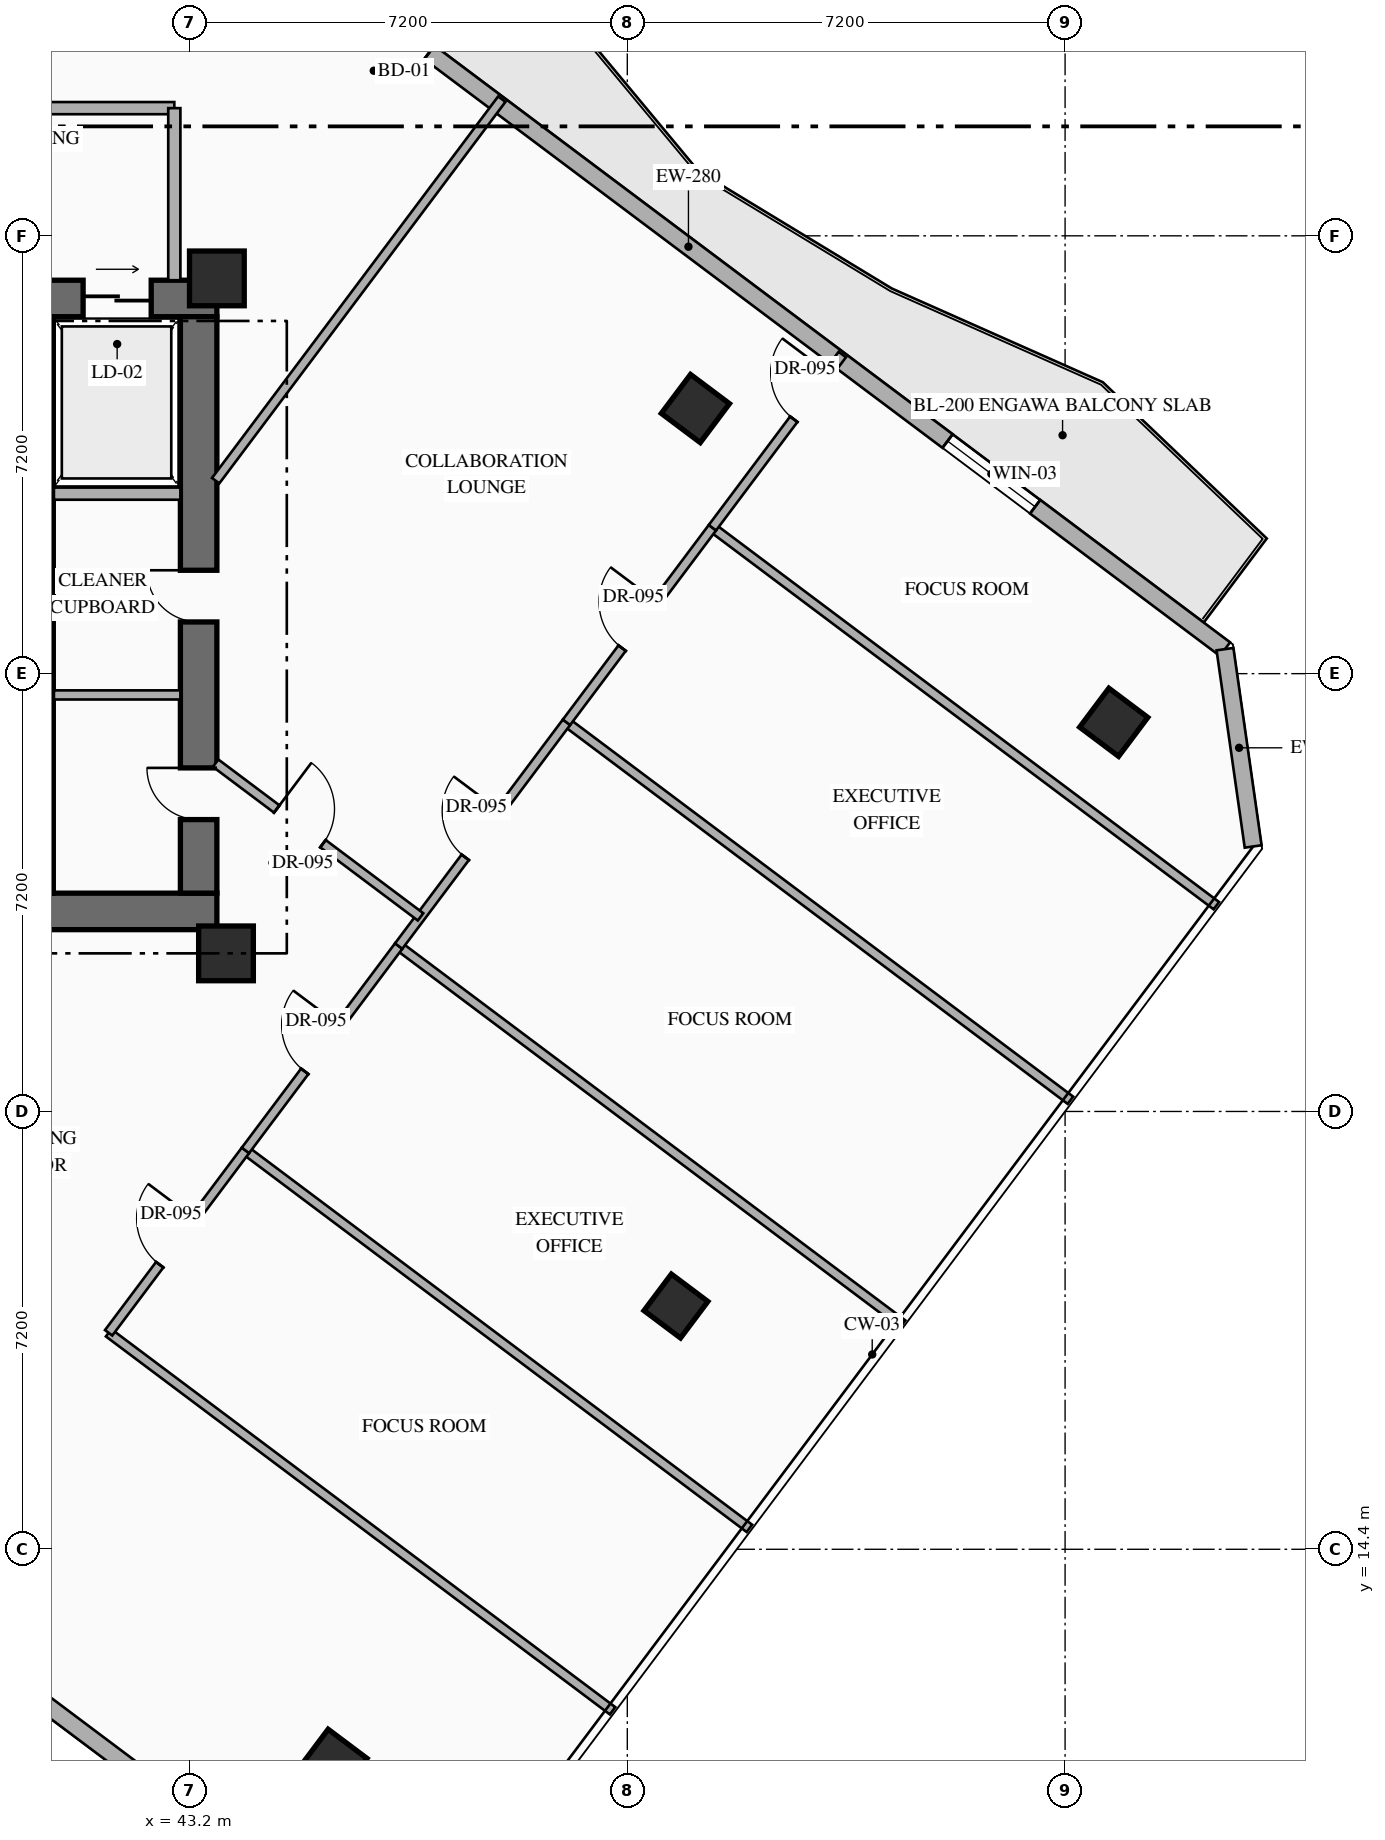
"""IFC4 building model, lengths in metres.
Left out: names, types, materials, properties, quantities, classifications, styles, units other than length and angle.
Written with IfcOpenShell. Run it as: python <this file> out.ifc"""

import sys

from ifc_helpers import new_model, si_unit, direction, frame, frame_2d, origin, origin_2d, place, context, subcontext, project, spatial, rectangle, hollow_rectangle, extrude, element, fill, save


model = new_model("IFC4")
c1 = context("Model", 3, precision=1e-05, world=origin(), true_north=direction((0.0, 1.0)))
c2 = subcontext(c1, "Body", "Model", "MODEL_VIEW")
j1 = project(units=[si_unit("LENGTHUNIT", "METRE"), si_unit("PLANEANGLEUNIT", "RADIAN")], contexts=[c1])
p1 = place(None, origin())
s1 = spatial("IfcSite", under=j1, at=p1, CompositionType="ELEMENT")
p2 = place(p1, origin())
s2 = spatial("IfcBuilding", under=s1, at=p2, CompositionType="ELEMENT")
p3 = place(p2, frame((0.0, 0.0, 167.25)))
s3 = spatial("IfcBuildingStorey", under=s2, at=p3, CompositionType="ELEMENT", Elevation=167.25)
p4 = place(p3, frame((35.89, 24.89, 0.0), z_axis=(0.0, 0.0, 1.0), x_axis=(1.0, 0.0, 0.0)))
e1 = element("IfcWall", 1, at=p4, inside=s3, PredefinedType="SHEAR", context=c2, shape_type="SweptSolid", body=[
    extrude(rectangle(XDim=7.76, YDim=0.6, at=frame_2d((3.88, 0.0))), origin(), (0.0, 0.0, 1.0), 3.6),
])
p5 = place(p3, frame((35.89, 34.97, 0.0), z_axis=(0.0, 0.0, 1.0), x_axis=(1.0, 0.0, 0.0)))
e2 = element("IfcWall", 2, at=p5, inside=s3, PredefinedType="SHEAR", context=c2, shape_type="SweptSolid", body=[
    extrude(rectangle(XDim=7.76, YDim=0.6, at=frame_2d((3.88, 0.0))), origin(), (0.0, 0.0, 1.0), 3.6),
])
p6 = place(p5, frame((2.66, 0.0, 0.0)))
e3 = element("IfcOpeningElement", 3, at=p6, cuts=e2, PredefinedType="OPENING", context=c2, shape_type="SweptSolid", body=[
    extrude(rectangle(XDim=1.1, YDim=2.2, at=frame_2d((0.55, 1.1))), frame((0.0, 0.31, 0.0), z_axis=(0.0, -1.0, 0.0), x_axis=(1.0, 0.0, 0.0)), (0.0, 0.0, 1.0), 0.62),
])
p7 = place(p5, frame((5.56, 0.0, 0.0)))
e4 = element("IfcOpeningElement", 4, at=p7, cuts=e2, PredefinedType="OPENING", context=c2, shape_type="SweptSolid", body=[
    extrude(rectangle(XDim=1.12, YDim=2.15, at=frame_2d((0.56, 1.075))), frame((0.0, 0.31, 0.0), z_axis=(0.0, -1.0, 0.0), x_axis=(1.0, 0.0, 0.0)), (0.0, 0.0, 1.0), 0.62),
])
p8 = place(p3, frame((43.35, 25.19, 0.0), z_axis=(0.0, 0.0, 1.0), x_axis=(0.0, 1.0, 0.0)))
e5 = element("IfcWall", 5, at=p8, inside=s3, PredefinedType="SHEAR", context=c2, shape_type="SweptSolid", body=[
    extrude(rectangle(XDim=9.48, YDim=0.6, at=frame_2d((4.74, 0.0))), origin(), (0.0, 0.0, 1.0), 3.6),
])
p9 = place(p8, frame((1.21, 0.0, 0.0)))
e6 = element("IfcOpeningElement", 6, at=p9, cuts=e5, PredefinedType="OPENING", context=c2, shape_type="SweptSolid", body=[
    extrude(rectangle(XDim=0.85, YDim=2.08, at=frame_2d((0.425, 1.04))), frame((0.0, 0.31, 0.0), z_axis=(0.0, -1.0, 0.0), x_axis=(1.0, 0.0, 0.0)), (0.0, 0.0, 1.0), 0.62),
])
p10 = place(p8, frame((4.46, 0.0, 0.0)))
e7 = element("IfcOpeningElement", 7, at=p10, cuts=e5, PredefinedType="OPENING", context=c2, shape_type="SweptSolid", body=[
    extrude(rectangle(XDim=0.85, YDim=2.08, at=frame_2d((0.425, 1.04))), frame((0.0, 0.31, 0.0), z_axis=(0.0, -1.0, 0.0), x_axis=(1.0, 0.0, 0.0)), (0.0, 0.0, 1.0), 0.62),
])
p11 = place(p3, frame((40.81, 25.19, 0.0), z_axis=(0.0, 0.0, 1.0), x_axis=(0.0, 1.0, 0.0)))
e8 = element("IfcWall", 8, at=p11, inside=s3, PredefinedType="SHEAR", context=c2, shape_type="SweptSolid", body=[
    extrude(rectangle(XDim=9.48, YDim=0.3, at=frame_2d((4.74, 0.0))), origin(), (0.0, 0.0, 1.0), 3.6),
])
for number, where, z_axis, x_axis in (
    (9, (43.8, 24.2, 0.0), (0.0, 0.0, 1.0), (1.0, 0.0, 0.0)),
    (10, (43.65, 35.3, 0.0), (0.0, 0.0, 1.0), (1.0, 0.0, 0.0)),
):
    element("IfcColumn", number, at=place(p3, frame(where, z_axis=z_axis, x_axis=x_axis)), inside=s3, PredefinedType="COLUMN", context=c2, shape_type="SweptSolid", body=[
        extrude(rectangle(XDim=0.9, YDim=0.9, at=origin_2d()), origin(), (0.0, 0.0, 1.0), 3.6),
    ])
for number, where, z_axis, x_axis in (
    (11, (51.52, 33.16, 0.0), (0.0, 0.0, 1.0), (0.8, -0.6, 0.0)),
    (12, (45.56, 10.88, 0.0), (0.0, 0.0, 1.0), (0.8, -0.6, 0.0)),
    (13, (58.4, 28.0, 0.0), (0.0, 0.0, 1.0), (0.8, -0.6, 0.0)),
):
    element("IfcColumn", number, at=place(p3, frame(where, z_axis=z_axis, x_axis=x_axis)), inside=s3, PredefinedType="COLUMN", context=c2, shape_type="SweptSolid", body=[
        extrude(hollow_rectangle(XDim=0.8, YDim=0.8, WallThickness=0.032, at=origin_2d()), origin(), (0.0, 0.0, 1.0), 3.6),
    ])
p12 = place(p3, frame((51.2, 18.4, 0.0), z_axis=(0.0, 0.0, 1.0), x_axis=(0.799999996291, -0.600000004945, 0.0)))
e14 = element("IfcColumn", 14, at=p12, inside=s3, PredefinedType="COLUMN", context=c2, shape_type="SweptSolid", body=[
    extrude(hollow_rectangle(XDim=0.75, YDim=0.75, WallThickness=0.028, at=origin_2d()), origin(), (0.0, 0.0, 1.0), 3.6),
])
p13 = place(p3, frame((44.86, 40.73, 0.0), z_axis=(0.0, 0.0, 1.0), x_axis=(0.800007624502, -0.599989833863, 0.0)))
e15 = element("IfcWall", 15, at=p13, inside=s3, PredefinedType="STANDARD", context=c2, shape_type="SweptSolid", body=[
    extrude(rectangle(XDim=19.212, YDim=0.28, at=frame_2d((9.606, 0.0))), origin(), (0.0, 0.0, 1.0), 3.35),
])
p14 = place(p13, frame((1.755, 0.0, 0.0)))
e16 = element("IfcOpeningElement", 16, at=p14, cuts=e15, PredefinedType="OPENING", context=c2, shape_type="SweptSolid", body=[
    extrude(rectangle(XDim=1.1, YDim=2.2, at=frame_2d((0.55, 1.1))), frame((0.0, 0.15, 0.0), z_axis=(0.0, -1.0, 0.0), x_axis=(1.0, 0.0, 0.0)), (0.0, 0.0, 1.0), 0.3),
])
p15 = place(p13, frame((13.509, 0.0, 0.85)))
e17 = element("IfcOpeningElement", 17, at=p15, cuts=e15, PredefinedType="OPENING", context=c2, shape_type="SweptSolid", body=[
    extrude(rectangle(XDim=1.8, YDim=2.1, at=frame_2d((0.9, 1.05))), frame((0.0, 0.15, 0.0), z_axis=(0.0, -1.0, 0.0), x_axis=(1.0, 0.0, 0.0)), (0.0, 0.0, 1.0), 0.3),
])
p16 = place(p3, frame((60.23, 29.203, 0.0), z_axis=(0.0, 0.0, 1.0), x_axis=(0.141296221922, -0.989967361922, 0.0)))
e18 = element("IfcWall", 18, at=p16, inside=s3, PredefinedType="STANDARD", context=c2, shape_type="SweptSolid", body=[
    extrude(rectangle(XDim=3.278, YDim=0.28, at=frame_2d((1.639, 0.0))), origin(), (0.0, 0.0, 1.0), 3.35),
])
p17 = place(p3, frame((44.918, 8.787, 0.0), z_axis=(0.0, 0.0, 1.0), x_axis=(-0.800004765927, 0.599993645378, 0.0)))
e19 = element("IfcWall", 19, at=p17, inside=s3, PredefinedType="STANDARD", context=c2, shape_type="SweptSolid", body=[
    extrude(rectangle(XDim=24.588, YDim=0.28, at=frame_2d((12.294, 0.0))), origin(), (0.0, 0.0, 1.0), 3.35),
])
p18 = place(p3, frame((40.97, 31.76, 0.0), z_axis=(0.0, 0.0, 1.0), x_axis=(1.0, 0.0, 0.0)))
e20 = element("IfcWall", 20, at=p18, inside=s3, PredefinedType="STANDARD", context=c2, shape_type="SweptSolid", body=[
    extrude(rectangle(XDim=2.08, YDim=0.2, at=frame_2d((1.04, 0.0))), origin(), (0.0, 0.0, 1.0), 3.35),
])
p19 = place(p3, frame((40.97, 28.45, 0.0), z_axis=(0.0, 0.0, 1.0), x_axis=(1.0, 0.0, 0.0)))
e21 = element("IfcWall", 21, at=p19, inside=s3, PredefinedType="PARTITIONING", context=c2, shape_type="SweptSolid", body=[
    extrude(rectangle(XDim=2.08, YDim=0.15, at=frame_2d((1.04, 0.0))), origin(), (0.0, 0.0, 1.0), 3.35),
])
p20 = place(p3, frame((37.65, 38.1, 0.0), z_axis=(0.0, 0.0, 1.0), x_axis=(1.0, 0.0, 0.0)))
e22 = element("IfcWall", 22, at=p20, inside=s3, PredefinedType="STANDARD", context=c2, shape_type="SweptSolid", body=[
    extrude(rectangle(XDim=5.3, YDim=0.2, at=frame_2d((2.65, 0.0))), origin(), (0.0, 0.0, 1.0), 3.35),
])
p21 = place(p3, frame((42.95, 35.27, 0.0), z_axis=(0.0, 0.0, 1.0), x_axis=(0.0, 1.0, 0.0)))
e23 = element("IfcWall", 23, at=p21, inside=s3, PredefinedType="STANDARD", context=c2, shape_type="SweptSolid", body=[
    extrude(rectangle(XDim=2.83, YDim=0.2, at=frame_2d((1.415, 0.0))), origin(), (0.0, 0.0, 1.0), 3.35),
])
for number, where, z_axis, x_axis in (
    (24, (41.87, 17.96, 0.0), (0.0, 0.0, 1.0), (0.8, -0.6, 0.0)),
    (25, (44.12, 20.96, 0.0), (0.0, 0.0, 1.0), (0.8, -0.6, 0.0)),
):
    element("IfcWall", number, at=place(p3, frame(where, z_axis=z_axis, x_axis=x_axis)), inside=s3, PredefinedType="PARTITIONING", context=c2, shape_type="SweptSolid", body=[
        extrude(rectangle(XDim=10.36, YDim=0.15, at=frame_2d((5.18, 0.0))), origin(), (0.0, 0.0, 1.0), 3.35),
    ])
p22 = place(p3, frame((41.87, 17.96, 0.0), z_axis=(0.0, 0.0, 1.0), x_axis=(0.6, 0.8, 0.0)))
e26 = element("IfcWall", 26, at=p22, inside=s3, PredefinedType="PARTITIONING", context=c2, shape_type="SweptSolid", body=[
    extrude(rectangle(XDim=3.75, YDim=0.15, at=frame_2d((1.875, 0.0))), origin(), (0.0, 0.0, 1.0), 3.35),
])
p23 = place(p22, frame((1.4, 0.0, 0.0)))
e27 = element("IfcOpeningElement", 27, at=p23, cuts=e26, PredefinedType="OPENING", context=c2, shape_type="SweptSolid", body=[
    extrude(rectangle(XDim=0.95, YDim=2.15, at=frame_2d((0.475, 1.075))), frame((0.0, 0.085, 0.0), z_axis=(0.0, -1.0, 0.0), x_axis=(1.0, 0.0, 0.0)), (0.0, 0.0, 1.0), 0.17),
])
p24 = place(p3, frame((46.64, 24.32, 0.0), z_axis=(0.0, 0.0, 1.0), x_axis=(0.8, -0.6, 0.0)))
e28 = element("IfcWall", 28, at=p24, inside=s3, PredefinedType="PARTITIONING", context=c2, shape_type="SweptSolid", body=[
    extrude(rectangle(XDim=10.36, YDim=0.15, at=frame_2d((5.18, 0.0))), origin(), (0.0, 0.0, 1.0), 3.35),
])
p25 = place(p3, frame((44.12, 20.96, 0.0), z_axis=(0.0, 0.0, 1.0), x_axis=(0.59995349547, 0.800034876286, 0.0)))
e29 = element("IfcWall", 29, at=p25, inside=s3, PredefinedType="PARTITIONING", context=c2, shape_type="SweptSolid", body=[
    extrude(rectangle(XDim=4.2, YDim=0.15, at=frame_2d((2.1, 0.0))), origin(), (0.0, 0.0, 1.0), 3.35),
])
p26 = place(p25, frame((1.625, 0.0, 0.0)))
e30 = element("IfcOpeningElement", 30, at=p26, cuts=e29, PredefinedType="OPENING", context=c2, shape_type="SweptSolid", body=[
    extrude(rectangle(XDim=0.95, YDim=2.15, at=frame_2d((0.475, 1.075))), frame((0.0, 0.085, 0.0), z_axis=(0.0, -1.0, 0.0), x_axis=(1.0, 0.0, 0.0)), (0.0, 0.0, 1.0), 0.17),
])
p27 = place(p3, frame((49.4, 28.0, 0.0), z_axis=(0.0, 0.0, 1.0), x_axis=(0.8, -0.6, 0.0)))
e31 = element("IfcWall", 31, at=p27, inside=s3, PredefinedType="PARTITIONING", context=c2, shape_type="SweptSolid", body=[
    extrude(rectangle(XDim=10.36, YDim=0.15, at=frame_2d((5.18, 0.0))), origin(), (0.0, 0.0, 1.0), 3.35),
])
p28 = place(p3, frame((46.64, 24.32, 0.0), z_axis=(0.0, 0.0, 1.0), x_axis=(0.600008491904, 0.799993631001, 0.0)))
e32 = element("IfcWall", 32, at=p28, inside=s3, PredefinedType="PARTITIONING", context=c2, shape_type="SweptSolid", body=[
    extrude(rectangle(XDim=4.6, YDim=0.15, at=frame_2d((2.3, 0.0))), origin(), (0.0, 0.0, 1.0), 3.35),
])
p29 = place(p28, frame((1.825, 0.0, 0.0)))
e33 = element("IfcOpeningElement", 33, at=p29, cuts=e32, PredefinedType="OPENING", context=c2, shape_type="SweptSolid", body=[
    extrude(rectangle(XDim=0.95, YDim=2.15, at=frame_2d((0.475, 1.075))), frame((0.0, 0.085, 0.0), z_axis=(0.0, -1.0, 0.0), x_axis=(1.0, 0.0, 0.0)), (0.0, 0.0, 1.0), 0.17),
])
p30 = place(p3, frame((51.8, 31.2, 0.0), z_axis=(0.0, 0.0, 1.0), x_axis=(0.799991516197, -0.600011311571, 0.0)))
e34 = element("IfcWall", 34, at=p30, inside=s3, PredefinedType="PARTITIONING", context=c2, shape_type="SweptSolid", body=[
    extrude(rectangle(XDim=10.36, YDim=0.15, at=frame_2d((5.18, 0.0))), origin(), (0.0, 0.0, 1.0), 3.35),
])
p31 = place(p3, frame((49.4, 28.0, 0.0), z_axis=(0.0, 0.0, 1.0), x_axis=(0.600029296115, 0.799978027076, 0.0)))
e35 = element("IfcWall", 35, at=p31, inside=s3, PredefinedType="PARTITIONING", context=c2, shape_type="SweptSolid", body=[
    extrude(rectangle(XDim=4.0, YDim=0.15, at=frame_2d((2.0, 0.0))), origin(), (0.0, 0.0, 1.0), 3.35),
])
p32 = place(p31, frame((1.525, 0.0, 0.0)))
e36 = element("IfcOpeningElement", 36, at=p32, cuts=e35, PredefinedType="OPENING", context=c2, shape_type="SweptSolid", body=[
    extrude(rectangle(XDim=0.95, YDim=2.15, at=frame_2d((0.475, 1.075))), frame((0.0, 0.085, 0.0), z_axis=(0.0, -1.0, 0.0), x_axis=(1.0, 0.0, 0.0)), (0.0, 0.0, 1.0), 0.17),
])
p33 = place(p3, frame((51.8, 31.2, 0.0), z_axis=(0.0, 0.0, 1.0), x_axis=(0.599978055212, 0.800016458121, 0.0)))
e37 = element("IfcWall", 37, at=p33, inside=s3, PredefinedType="PARTITIONING", context=c2, shape_type="SweptSolid", body=[
    extrude(rectangle(XDim=3.56, YDim=0.15, at=frame_2d((1.78, 0.0))), origin(), (0.0, 0.0, 1.0), 3.35),
])
p34 = place(p33, frame((2.23, 0.0, 0.0)))
e38 = element("IfcOpeningElement", 38, at=p34, cuts=e37, PredefinedType="OPENING", context=c2, shape_type="SweptSolid", body=[
    extrude(rectangle(XDim=0.95, YDim=2.15, at=frame_2d((0.475, 1.075))), frame((0.0, 0.085, 0.0), z_axis=(0.0, -1.0, 0.0), x_axis=(1.0, 0.0, 0.0)), (0.0, 0.0, 1.0), 0.17),
])
p35 = place(p3, frame((43.63, 27.328, 0.0), z_axis=(0.0, 0.0, 1.0), x_axis=(0.799972182084, -0.600037088764, 0.0)))
e39 = element("IfcWall", 39, at=p35, inside=s3, PredefinedType="PARTITIONING", context=c2, shape_type="SweptSolid", body=[
    extrude(rectangle(XDim=4.213, YDim=0.15, at=frame_2d((2.106, 0.0))), origin(), (0.0, 0.0, 1.0), 3.045),
])
p36 = place(p35, frame((1.256, 0.0, 0.0)))
e40 = element("IfcOpeningElement", 40, at=p36, cuts=e39, PredefinedType="OPENING", context=c2, shape_type="SweptSolid", body=[
    extrude(rectangle(XDim=0.95, YDim=2.15, at=frame_2d((0.475, 1.075))), frame((0.0, 0.085, 0.0), z_axis=(0.0, -1.0, 0.0), x_axis=(1.0, 0.0, 0.0)), (0.0, 0.0, 1.0), 0.17),
])
p37 = place(p3, frame((43.63, 31.973, 0.0), z_axis=(0.0, 0.0, 1.0), x_axis=(0.599975099311, 0.800018674911, 0.0)))
e41 = element("IfcWall", 41, at=p37, inside=s3, PredefinedType="PARTITIONING", context=c2, shape_type="SweptSolid", body=[
    extrude(rectangle(XDim=7.844, YDim=0.15, at=frame_2d((3.922, 0.0))), origin(), (0.0, 0.0, 1.0), 3.35),
])
p38 = place(p14, origin())
e42 = element("IfcDoor", 42, at=p38, inside=s3, OperationType="SINGLE_SWING_LEFT", PredefinedType="DOOR", context=c2, shape_type="SweptSolid", body=[
    extrude(rectangle(XDim=1.1, YDim=2.2, at=frame_2d((0.55, 1.1))), frame((0.0, 0.025, 0.0), z_axis=(0.0, -1.0, 0.0), x_axis=(1.0, 0.0, 0.0)), (0.0, 0.0, 1.0), 0.05),
])
fill(e16, e42)
p39 = place(p15, origin())
e43 = element("IfcWindow", 43, at=p39, inside=s3, PartitioningType="SINGLE_PANEL", PredefinedType="WINDOW", context=c2, shape_type="SweptSolid", body=[
    extrude(rectangle(XDim=1.8, YDim=2.1, at=frame_2d((0.9, 1.05))), frame((0.0, 0.03, 0.0), z_axis=(0.0, -1.0, 0.0), x_axis=(1.0, 0.0, 0.0)), (0.0, 0.0, 1.0), 0.06),
])
fill(e17, e43)
p40 = place(p7, origin())
e44 = element("IfcDoor", 44, at=p40, inside=s3, OperationType="SLIDING_TO_RIGHT", PredefinedType="USERDEFINED", context=c2, shape_type="SweptSolid", body=[
    extrude(rectangle(XDim=1.12, YDim=2.15, at=frame_2d((0.56, 1.075))), frame((0.0, 0.025, 0.0), z_axis=(0.0, -1.0, 0.0), x_axis=(1.0, 0.0, 0.0)), (0.0, 0.0, 1.0), 0.05),
])
fill(e4, e44)
p41 = place(p9, origin())
e45 = element("IfcDoor", 45, at=p41, inside=s3, OperationType="SINGLE_SWING_RIGHT", PredefinedType="DOOR", context=c2, shape_type="SweptSolid", body=[
    extrude(rectangle(XDim=0.85, YDim=2.08, at=frame_2d((0.425, 1.04))), frame((0.0, 0.025, 0.0), z_axis=(0.0, -1.0, 0.0), x_axis=(1.0, 0.0, 0.0)), (0.0, 0.0, 1.0), 0.05),
])
fill(e6, e45)
p42 = place(p10, origin())
e46 = element("IfcDoor", 46, at=p42, inside=s3, OperationType="SINGLE_SWING_RIGHT", PredefinedType="DOOR", context=c2, shape_type="SweptSolid", body=[
    extrude(rectangle(XDim=0.85, YDim=2.08, at=frame_2d((0.425, 1.04))), frame((0.0, 0.025, 0.0), z_axis=(0.0, -1.0, 0.0), x_axis=(1.0, 0.0, 0.0)), (0.0, 0.0, 1.0), 0.05),
])
fill(e7, e46)
p43 = place(p23, origin())
e47 = element("IfcDoor", 47, at=p43, inside=s3, OperationType="SINGLE_SWING_RIGHT", PredefinedType="DOOR", context=c2, shape_type="SweptSolid", body=[
    extrude(rectangle(XDim=0.95, YDim=2.15, at=frame_2d((0.475, 1.075))), frame((0.0, 0.025, 0.0), z_axis=(0.0, -1.0, 0.0), x_axis=(1.0, 0.0, 0.0)), (0.0, 0.0, 1.0), 0.05),
])
fill(e27, e47)
p44 = place(p26, origin())
e48 = element("IfcDoor", 48, at=p44, inside=s3, OperationType="SINGLE_SWING_RIGHT", PredefinedType="DOOR", context=c2, shape_type="SweptSolid", body=[
    extrude(rectangle(XDim=0.95, YDim=2.15, at=frame_2d((0.475, 1.075))), frame((0.0, 0.025, 0.0), z_axis=(0.0, -1.0, 0.0), x_axis=(1.0, 0.0, 0.0)), (0.0, 0.0, 1.0), 0.05),
])
fill(e30, e48)
p45 = place(p29, origin())
e49 = element("IfcDoor", 49, at=p45, inside=s3, OperationType="SINGLE_SWING_RIGHT", PredefinedType="DOOR", context=c2, shape_type="SweptSolid", body=[
    extrude(rectangle(XDim=0.95, YDim=2.15, at=frame_2d((0.475, 1.075))), frame((0.0, 0.025, 0.0), z_axis=(0.0, -1.0, 0.0), x_axis=(1.0, 0.0, 0.0)), (0.0, 0.0, 1.0), 0.05),
])
fill(e33, e49)
p46 = place(p32, origin())
e50 = element("IfcDoor", 50, at=p46, inside=s3, OperationType="SINGLE_SWING_RIGHT", PredefinedType="DOOR", context=c2, shape_type="SweptSolid", body=[
    extrude(rectangle(XDim=0.95, YDim=2.15, at=frame_2d((0.475, 1.075))), frame((0.0, 0.025, 0.0), z_axis=(0.0, -1.0, 0.0), x_axis=(1.0, 0.0, 0.0)), (0.0, 0.0, 1.0), 0.05),
])
fill(e36, e50)
p47 = place(p34, origin())
e51 = element("IfcDoor", 51, at=p47, inside=s3, OperationType="SINGLE_SWING_RIGHT", PredefinedType="DOOR", context=c2, shape_type="SweptSolid", body=[
    extrude(rectangle(XDim=0.95, YDim=2.15, at=frame_2d((0.475, 1.075))), frame((0.0, 0.025, 0.0), z_axis=(0.0, -1.0, 0.0), x_axis=(1.0, 0.0, 0.0)), (0.0, 0.0, 1.0), 0.05),
])
fill(e38, e51)
p48 = place(p36, origin())
e52 = element("IfcDoor", 52, at=p48, inside=s3, OperationType="SINGLE_SWING_LEFT", PredefinedType="DOOR", context=c2, shape_type="SweptSolid", body=[
    extrude(rectangle(XDim=0.95, YDim=2.15, at=frame_2d((0.475, 1.075))), frame((0.0, 0.025, 0.0), z_axis=(0.0, -1.0, 0.0), x_axis=(1.0, 0.0, 0.0)), (0.0, 0.0, 1.0), 0.05),
])
fill(e40, e52)
save(model, sys.argv[1])
